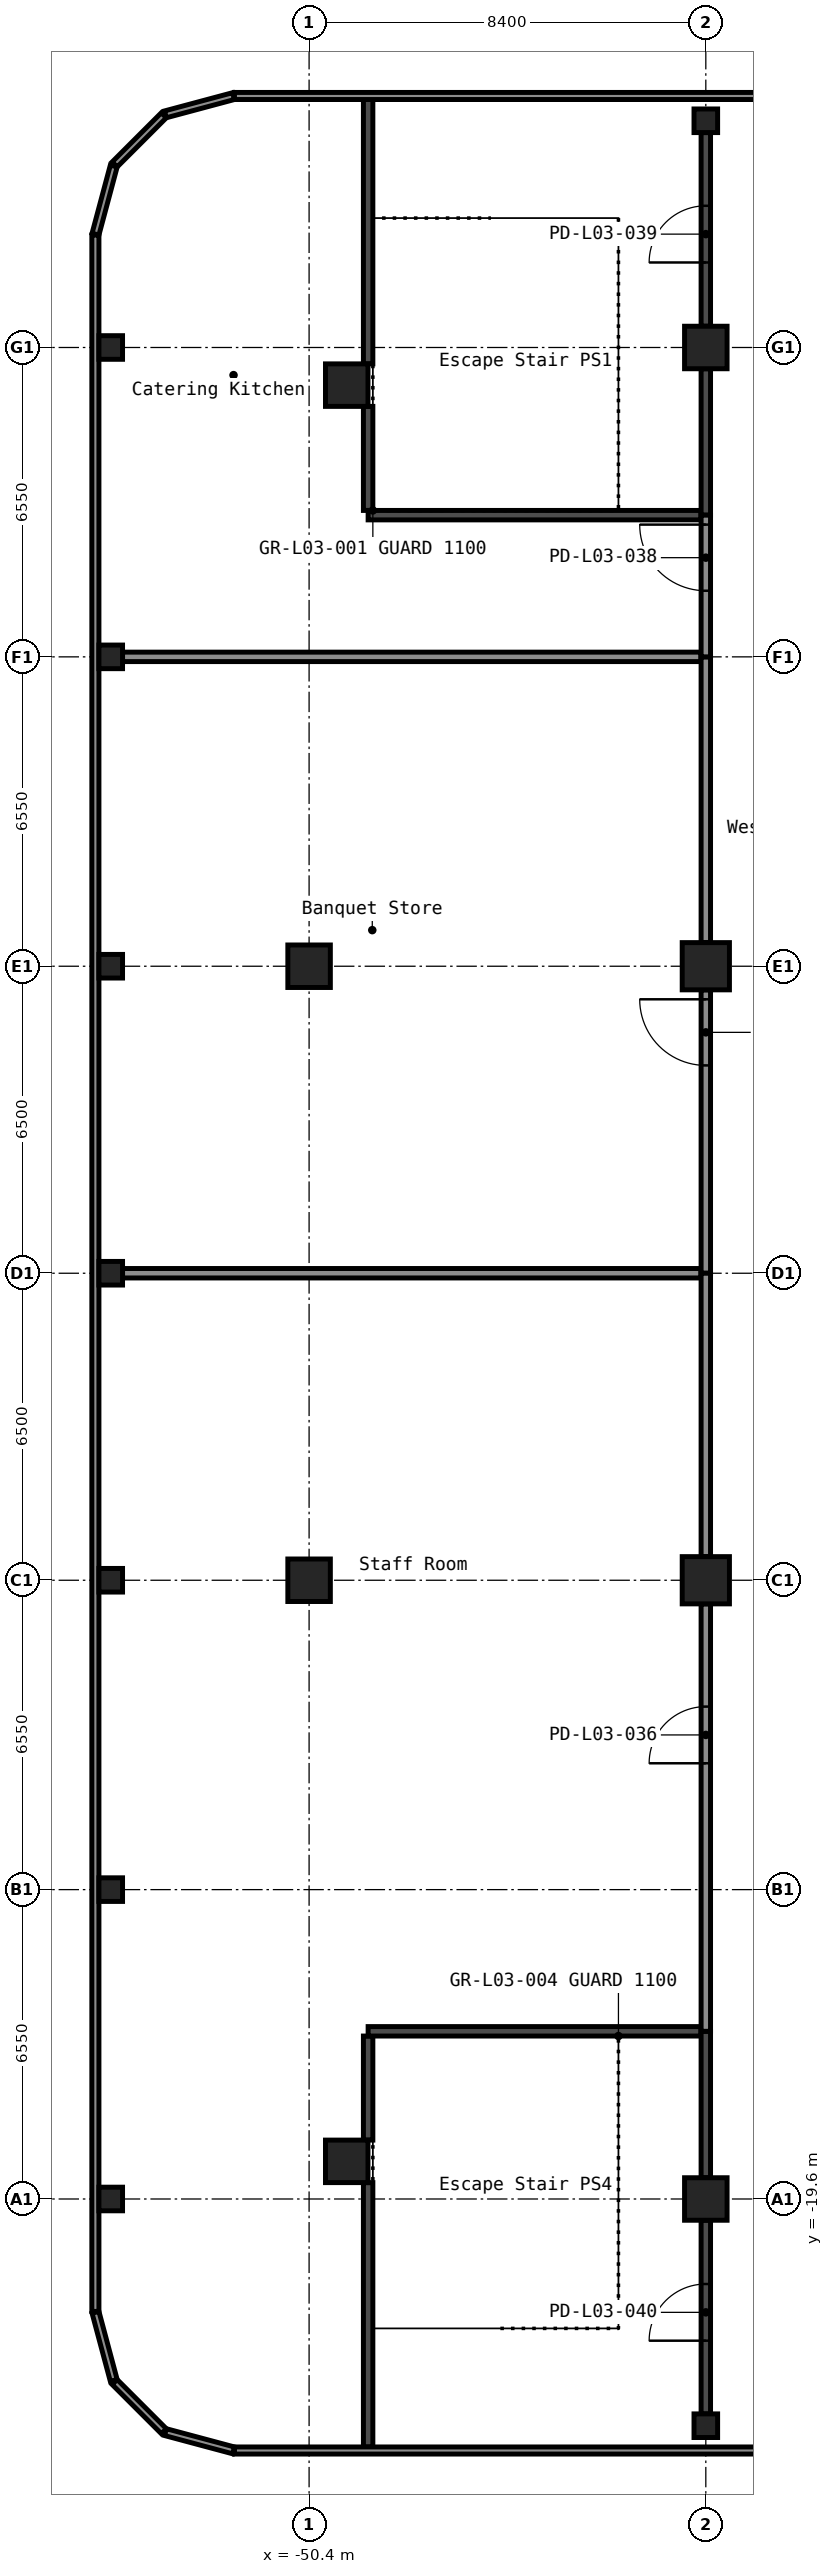
"""IFC4 building model, lengths in metres.
Left out: names, types, materials, properties, quantities, classifications, styles, units other than length and angle.
Written with IfcOpenShell. Run it as: python <this file> out.ifc"""

import sys

from ifc_helpers import new_model, si_unit, direction, frame, frame_2d, origin, origin_2d, place, context, subcontext, project, spatial, rectangle, hollow_rectangle, extrude, element, fill, save


model = new_model("IFC4")
c1 = context("Model", 3, precision=1e-05, world=origin(), true_north=direction((0.0, 1.0)))
c2 = subcontext(c1, "Body", "Model", "MODEL_VIEW")
j1 = project(units=[si_unit("LENGTHUNIT", "METRE"), si_unit("PLANEANGLEUNIT", "RADIAN")], contexts=[c1])
p1 = place(None, origin())
s1 = spatial("IfcSite", under=j1, at=p1, CompositionType="ELEMENT")
p2 = place(p1, origin())
s2 = spatial("IfcBuilding", under=s1, at=p2, CompositionType="ELEMENT")
p3 = place(p2, frame((0.0, 0.0, 15.0)))
s3 = spatial("IfcBuildingStorey", under=s2, at=p3, CompositionType="ELEMENT", Elevation=15.0)
for number, where, z_axis, x_axis in (
    (1, (-49.603, -18.803, 0.0), (0.0, 0.0, 1.0), (1.0, 0.0, 0.0)),
    (2, (-50.4, -6.5, 0.0), (0.0, 0.0, 1.0), (1.0, 0.0, 0.0)),
    (3, (-50.4, 6.5, 0.0), (0.0, 0.0, 1.0), (1.0, 0.0, 0.0)),
    (4, (-49.603, 18.803, 0.0), (0.0, 0.0, 1.0), (1.0, 0.0, 0.0)),
    (5, (-42.0, -19.6, 0.0), (0.0, 0.0, 1.0), (1.0, 0.0, 0.0)),
):
    element("IfcColumn", number, at=place(p3, frame(where, z_axis=z_axis, x_axis=x_axis)), inside=s3, PredefinedType="COLUMN", context=c2, shape_type="SweptSolid", body=[
        extrude(hollow_rectangle(XDim=0.9, YDim=0.9, WallThickness=0.036, at=origin_2d()), origin(), (0.0, 0.0, 1.0), 4.4),
    ])
for number, where, z_axis, x_axis in (
    (6, (-42.0, -6.5, 0.0), (0.0, 0.0, 1.0), (1.0, 0.0, 0.0)),
    (7, (-42.0, 6.5, 0.0), (0.0, 0.0, 1.0), (1.0, 0.0, 0.0)),
):
    element("IfcColumn", number, at=place(p3, frame(where, z_axis=z_axis, x_axis=x_axis)), inside=s3, PredefinedType="COLUMN", context=c2, shape_type="SweptSolid", body=[
        extrude(hollow_rectangle(XDim=1.0, YDim=1.0, WallThickness=0.04, at=origin_2d()), origin(), (0.0, 0.0, 1.0), 4.4),
    ])
p4 = place(p3, frame((-42.0, 19.6, 0.0), z_axis=(0.0, 0.0, 1.0), x_axis=(1.0, 0.0, 0.0)))
e8 = element("IfcColumn", 8, at=p4, inside=s3, PredefinedType="COLUMN", context=c2, shape_type="SweptSolid", body=[
    extrude(hollow_rectangle(XDim=0.9, YDim=0.9, WallThickness=0.036, at=origin_2d()), origin(), (0.0, 0.0, 1.0), 4.4),
])
for number, where, z_axis, x_axis in (
    (9, (-42.0, -24.4, 0.0), (0.0, 0.0, 1.0), (1.0, 0.0, 0.0)),
    (10, (-42.0, 24.4, 0.0), (0.0, 0.0, 1.0), (1.0, 0.0, 0.0)),
    (11, (-54.6, -19.6, 0.0), (0.0, 0.0, 1.0), (1.0, 0.0, 0.0)),
    (12, (-54.6, -13.05, 0.0), (0.0, 0.0, 1.0), (1.0, 0.0, 0.0)),
    (13, (-54.6, -6.5, 0.0), (0.0, 0.0, 1.0), (1.0, 0.0, 0.0)),
    (14, (-54.6, 0.0, 0.0), (0.0, 0.0, 1.0), (1.0, 0.0, 0.0)),
    (15, (-54.6, 6.5, 0.0), (0.0, 0.0, 1.0), (1.0, 0.0, 0.0)),
    (16, (-54.6, 13.05, 0.0), (0.0, 0.0, 1.0), (1.0, 0.0, 0.0)),
    (17, (-54.6, 19.6, 0.0), (0.0, 0.0, 1.0), (1.0, 0.0, 0.0)),
):
    element("IfcColumn", number, at=place(p3, frame(where, z_axis=z_axis, x_axis=x_axis)), inside=s3, PredefinedType="COLUMN", context=c2, shape_type="SweptSolid", body=[
        extrude(hollow_rectangle(XDim=0.5, YDim=0.5, WallThickness=0.019, InnerFilletRadius=0.029, OuterFilletRadius=0.048, at=origin_2d()), origin(), (0.0, 0.0, 1.0), 4.4),
    ])
p5 = place(p3, frame((-54.35, 13.05, 0.0), z_axis=(0.0, 0.0, 1.0), x_axis=(1.0, 0.0, 0.0)))
e18 = element("IfcWall", 18, at=p5, inside=s3, PredefinedType="PARTITIONING", context=c2, shape_type="SweptSolid", body=[
    extrude(rectangle(XDim=12.25, YDim=0.2, at=frame_2d((6.125, 0.0))), origin(), (0.0, 0.0, 1.0), 4.4),
])
p6 = place(p3, frame((-49.15, 16.15, 0.0), z_axis=(0.0, 0.0, 1.0), x_axis=(0.0, 1.0, 0.0)))
e19 = element("IfcWall", 19, at=p6, inside=s3, PredefinedType="SHEAR", context=c2, shape_type="SweptSolid", body=[
    extrude(rectangle(XDim=2.203, YDim=0.2, at=frame_2d((1.102, 0.0))), origin(), (0.0, 0.0, 1.0), 4.4),
])
p7 = place(p3, frame((-49.15, 19.253, 0.0), z_axis=(0.0, 0.0, 1.0), x_axis=(0.0, 1.0, 0.0)))
e20 = element("IfcWall", 20, at=p7, inside=s3, PredefinedType="SHEAR", context=c2, shape_type="SweptSolid", body=[
    extrude(rectangle(XDim=5.597, YDim=0.2, at=frame_2d((2.798, 0.0))), origin(), (0.0, 0.0, 1.0), 4.4),
])
p8 = place(p3, frame((-42.1, 16.05, 0.0), z_axis=(0.0, 0.0, 1.0), x_axis=(-1.0, 0.0, 0.0)))
e21 = element("IfcWall", 21, at=p8, inside=s3, PredefinedType="SHEAR", context=c2, shape_type="SweptSolid", body=[
    extrude(rectangle(XDim=7.05, YDim=0.2, at=frame_2d((3.525, 0.0))), origin(), (0.0, 0.0, 1.0), 4.4),
])
p9 = place(p3, frame((-42.0, 24.15, 0.0), z_axis=(0.0, 0.0, 1.0), x_axis=(0.0, -1.0, 0.0)))
e22 = element("IfcWall", 22, at=p9, inside=s3, PredefinedType="SHEAR", context=c2, shape_type="SweptSolid", body=[
    extrude(rectangle(XDim=4.1, YDim=0.2, at=frame_2d((2.05, 0.0))), origin(), (0.0, 0.0, 1.0), 4.4),
])
p10 = place(p9, frame((1.55, 0.0, 0.0)))
e23 = element("IfcOpeningElement", 23, at=p10, cuts=e22, PredefinedType="OPENING", context=c2, shape_type="SweptSolid", body=[
    extrude(rectangle(XDim=1.2, YDim=2.1, at=frame_2d((0.6, 1.05))), frame((0.0, 0.11, 0.0), z_axis=(0.0, -1.0, 0.0), x_axis=(1.0, 0.0, 0.0)), (0.0, 0.0, 1.0), 0.22),
])
p11 = place(p3, frame((-42.0, 19.15, 0.0), z_axis=(0.0, 0.0, 1.0), x_axis=(0.0, -1.0, 0.0)))
e24 = element("IfcWall", 24, at=p11, inside=s3, PredefinedType="SHEAR", context=c2, shape_type="SweptSolid", body=[
    extrude(rectangle(XDim=3.1, YDim=0.2, at=frame_2d((1.55, 0.0))), origin(), (0.0, 0.0, 1.0), 4.4),
])
p12 = place(p3, frame((-49.15, -24.85, 0.0), z_axis=(0.0, 0.0, 1.0), x_axis=(0.0, 1.0, 0.0)))
e25 = element("IfcWall", 25, at=p12, inside=s3, PredefinedType="SHEAR", context=c2, shape_type="SweptSolid", body=[
    extrude(rectangle(XDim=5.597, YDim=0.2, at=frame_2d((2.798, 0.0))), origin(), (0.0, 0.0, 1.0), 4.4),
])
p13 = place(p3, frame((-49.15, -18.353, 0.0), z_axis=(0.0, 0.0, 1.0), x_axis=(0.0, 1.0, 0.0)))
e26 = element("IfcWall", 26, at=p13, inside=s3, PredefinedType="SHEAR", context=c2, shape_type="SweptSolid", body=[
    extrude(rectangle(XDim=2.203, YDim=0.2, at=frame_2d((1.102, 0.0))), origin(), (0.0, 0.0, 1.0), 4.4),
])
p14 = place(p3, frame((-49.15, -16.05, 0.0), z_axis=(0.0, 0.0, 1.0), x_axis=(1.0, 0.0, 0.0)))
e27 = element("IfcWall", 27, at=p14, inside=s3, PredefinedType="SHEAR", context=c2, shape_type="SweptSolid", body=[
    extrude(rectangle(XDim=7.05, YDim=0.2, at=frame_2d((3.525, 0.0))), origin(), (0.0, 0.0, 1.0), 4.4),
])
p15 = place(p3, frame((-42.0, -16.05, 0.0), z_axis=(0.0, 0.0, 1.0), x_axis=(0.0, -1.0, 0.0)))
e28 = element("IfcWall", 28, at=p15, inside=s3, PredefinedType="SHEAR", context=c2, shape_type="SweptSolid", body=[
    extrude(rectangle(XDim=3.1, YDim=0.2, at=frame_2d((1.55, 0.0))), origin(), (0.0, 0.0, 1.0), 4.4),
])
p16 = place(p3, frame((-42.0, -20.05, 0.0), z_axis=(0.0, 0.0, 1.0), x_axis=(0.0, -1.0, 0.0)))
e29 = element("IfcWall", 29, at=p16, inside=s3, PredefinedType="SHEAR", context=c2, shape_type="SweptSolid", body=[
    extrude(rectangle(XDim=4.1, YDim=0.2, at=frame_2d((2.05, 0.0))), origin(), (0.0, 0.0, 1.0), 4.4),
])
p17 = place(p16, frame((1.35, 0.0, 0.0)))
e30 = element("IfcOpeningElement", 30, at=p17, cuts=e29, PredefinedType="OPENING", context=c2, shape_type="SweptSolid", body=[
    extrude(rectangle(XDim=1.2, YDim=2.1, at=frame_2d((0.6, 1.05))), frame((0.0, 0.11, 0.0), z_axis=(0.0, -1.0, 0.0), x_axis=(1.0, 0.0, 0.0)), (0.0, 0.0, 1.0), 0.22),
])
p18 = place(p3, frame((-54.35, 0.0, 0.0), z_axis=(0.0, 0.0, 1.0), x_axis=(1.0, 0.0, 0.0)))
e31 = element("IfcWall", 31, at=p18, inside=s3, PredefinedType="PARTITIONING", context=c2, shape_type="SweptSolid", body=[
    extrude(rectangle(XDim=12.25, YDim=0.2, at=frame_2d((6.125, 0.0))), origin(), (0.0, 0.0, 1.0), 4.4),
])
p19 = place(p3, frame((-42.0, 0.0, 0.0), z_axis=(0.0, 0.0, 1.0), x_axis=(0.0, 1.0, 0.0)))
e32 = element("IfcWall", 32, at=p19, inside=s3, PredefinedType="PARTITIONING", context=c2, shape_type="SweptSolid", body=[
    extrude(rectangle(XDim=6.0, YDim=0.2, at=frame_2d((3.0, 0.0))), origin(), (0.0, 0.0, 1.0), 4.4),
])
p20 = place(p19, frame((4.4, 0.0, 0.0)))
e33 = element("IfcOpeningElement", 33, at=p20, cuts=e32, PredefinedType="OPENING", context=c2, shape_type="SweptSolid", body=[
    extrude(rectangle(XDim=1.4, YDim=2.1, at=frame_2d((0.7, 1.05))), frame((0.0, 0.11, 0.0), z_axis=(0.0, -1.0, 0.0), x_axis=(1.0, 0.0, 0.0)), (0.0, 0.0, 1.0), 0.22),
])
p21 = place(p3, frame((-42.0, 7.0, 0.0), z_axis=(0.0, 0.0, 1.0), x_axis=(0.0, 1.0, 0.0)))
e34 = element("IfcWall", 34, at=p21, inside=s3, PredefinedType="PARTITIONING", context=c2, shape_type="SweptSolid", body=[
    extrude(rectangle(XDim=6.05, YDim=0.2, at=frame_2d((3.025, 0.0))), origin(), (0.0, 0.0, 1.0), 4.4),
])
p22 = place(p3, frame((-42.0, 13.05, 0.0), z_axis=(0.0, 0.0, 1.0), x_axis=(0.0, 1.0, 0.0)))
e35 = element("IfcWall", 35, at=p22, inside=s3, PredefinedType="PARTITIONING", context=c2, shape_type="SweptSolid", body=[
    extrude(rectangle(XDim=3.0, YDim=0.2, at=frame_2d((1.5, 0.0))), origin(), (0.0, 0.0, 1.0), 4.4),
])
p23 = place(p22, frame((1.4, 0.0, 0.0)))
e36 = element("IfcOpeningElement", 36, at=p23, cuts=e35, PredefinedType="OPENING", context=c2, shape_type="SweptSolid", body=[
    extrude(rectangle(XDim=1.4, YDim=2.1, at=frame_2d((0.7, 1.05))), frame((0.0, 0.11, 0.0), z_axis=(0.0, -1.0, 0.0), x_axis=(1.0, 0.0, 0.0)), (0.0, 0.0, 1.0), 0.22),
])
p24 = place(p3, frame((-42.0, -16.05, 0.0), z_axis=(0.0, 0.0, 1.0), x_axis=(0.0, 1.0, 0.0)))
e37 = element("IfcWall", 37, at=p24, inside=s3, PredefinedType="PARTITIONING", context=c2, shape_type="SweptSolid", body=[
    extrude(rectangle(XDim=9.05, YDim=0.2, at=frame_2d((4.525, 0.0))), origin(), (0.0, 0.0, 1.0), 4.4),
])
p25 = place(p24, frame((5.675, 0.0, 0.0)))
e38 = element("IfcOpeningElement", 38, at=p25, cuts=e37, PredefinedType="OPENING", context=c2, shape_type="SweptSolid", body=[
    extrude(rectangle(XDim=1.2, YDim=2.1, at=frame_2d((0.6, 1.05))), frame((0.0, 0.11, 0.0), z_axis=(0.0, -1.0, 0.0), x_axis=(1.0, 0.0, 0.0)), (0.0, 0.0, 1.0), 0.22),
])
p26 = place(p3, frame((-42.0, -6.0, 0.0), z_axis=(0.0, 0.0, 1.0), x_axis=(0.0, 1.0, 0.0)))
e39 = element("IfcWall", 39, at=p26, inside=s3, PredefinedType="PARTITIONING", context=c2, shape_type="SweptSolid", body=[
    extrude(rectangle(XDim=6.0, YDim=0.2, at=frame_2d((3.0, 0.0))), origin(), (0.0, 0.0, 1.0), 4.4),
])
p27 = place(p3, frame((-8.4, -24.925, 0.0), z_axis=(0.0, 0.0, 1.0), x_axis=(-1.0, 0.0, 0.0)))
e40 = element("IfcWall", 40, at=p27, inside=s3, PredefinedType="STANDARD", context=c2, shape_type="SweptSolid", body=[
    extrude(rectangle(XDim=43.58, YDim=0.15, at=frame_2d((21.79, 0.0))), origin(), (0.0, 0.0, 1.0), 4.4),
])
p28 = place(p3, frame((-52.0, -24.922, 0.0), z_axis=(0.0, 0.0, 1.0), x_axis=(-0.965946591624, 0.258741535379, 0.0)))
e41 = element("IfcWall", 41, at=p28, inside=s3, PredefinedType="STANDARD", context=c2, shape_type="SweptSolid", body=[
    extrude(rectangle(XDim=1.493, YDim=0.15, at=frame_2d((0.746, 0.0))), origin(), (0.0, 0.0, 1.0), 4.4),
])
p29 = place(p3, frame((-53.475, -24.517, 0.0), z_axis=(0.0, 0.0, 1.0), x_axis=(-0.707106781187, 0.707106781187, 0.0)))
e42 = element("IfcWall", 42, at=p29, inside=s3, PredefinedType="STANDARD", context=c2, shape_type="SweptSolid", body=[
    extrude(rectangle(XDim=1.473, YDim=0.15, at=frame_2d((0.736, 0.0))), origin(), (0.0, 0.0, 1.0), 4.4),
])
p30 = place(p3, frame((-54.536, -23.442, 0.0), z_axis=(0.0, 0.0, 1.0), x_axis=(-0.258741535379, 0.965946591624, 0.0)))
e43 = element("IfcWall", 43, at=p30, inside=s3, PredefinedType="STANDARD", context=c2, shape_type="SweptSolid", body=[
    extrude(rectangle(XDim=1.493, YDim=0.15, at=frame_2d((0.746, 0.0))), origin(), (0.0, 0.0, 1.0), 4.4),
])
p31 = place(p3, frame((-54.925, -21.98, 0.0), z_axis=(0.0, 0.0, 1.0), x_axis=(0.0, 1.0, 0.0)))
e44 = element("IfcWall", 44, at=p31, inside=s3, PredefinedType="STANDARD", context=c2, shape_type="SweptSolid", body=[
    extrude(rectangle(XDim=43.96, YDim=0.15, at=frame_2d((21.98, 0.0))), origin(), (0.0, 0.0, 1.0), 4.4),
])
p32 = place(p3, frame((-54.922, 22.0, 0.0), z_axis=(0.0, 0.0, 1.0), x_axis=(0.258741535379, 0.965946591624, 0.0)))
e45 = element("IfcWall", 45, at=p32, inside=s3, PredefinedType="STANDARD", context=c2, shape_type="SweptSolid", body=[
    extrude(rectangle(XDim=1.493, YDim=0.15, at=frame_2d((0.746, 0.0))), origin(), (0.0, 0.0, 1.0), 4.4),
])
p33 = place(p3, frame((-54.517, 23.475, 0.0), z_axis=(0.0, 0.0, 1.0), x_axis=(0.707106781187, 0.707106781187, 0.0)))
e46 = element("IfcWall", 46, at=p33, inside=s3, PredefinedType="STANDARD", context=c2, shape_type="SweptSolid", body=[
    extrude(rectangle(XDim=1.473, YDim=0.15, at=frame_2d((0.736, 0.0))), origin(), (0.0, 0.0, 1.0), 4.4),
])
p34 = place(p3, frame((-53.442, 24.536, 0.0), z_axis=(0.0, 0.0, 1.0), x_axis=(0.965946591624, 0.258741535379, 0.0)))
e47 = element("IfcWall", 47, at=p34, inside=s3, PredefinedType="STANDARD", context=c2, shape_type="SweptSolid", body=[
    extrude(rectangle(XDim=1.493, YDim=0.15, at=frame_2d((0.746, 0.0))), origin(), (0.0, 0.0, 1.0), 4.4),
])
p35 = place(p3, frame((-51.98, 24.925, 0.0), z_axis=(0.0, 0.0, 1.0), x_axis=(1.0, 0.0, 0.0)))
e48 = element("IfcWall", 48, at=p35, inside=s3, PredefinedType="STANDARD", context=c2, shape_type="SweptSolid", body=[
    extrude(rectangle(XDim=12.98, YDim=0.15, at=frame_2d((6.49, 0.0))), origin(), (0.0, 0.0, 1.0), 4.4),
])
p36 = place(p25, origin())
e49 = element("IfcDoor", 49, at=p36, inside=s3, OperationType="SINGLE_SWING_RIGHT", PredefinedType="DOOR", context=c2, shape_type="SweptSolid", body=[
    extrude(rectangle(XDim=1.2, YDim=2.1, at=frame_2d((0.6, 1.05))), frame((0.0, 0.025, 0.0), z_axis=(0.0, -1.0, 0.0), x_axis=(1.0, 0.0, 0.0)), (0.0, 0.0, 1.0), 0.05),
])
fill(e38, e49)
p37 = place(p20, origin())
e50 = element("IfcDoor", 50, at=p37, inside=s3, OperationType="SINGLE_SWING_LEFT", PredefinedType="DOOR", context=c2, shape_type="SweptSolid", body=[
    extrude(rectangle(XDim=1.4, YDim=2.1, at=frame_2d((0.7, 1.05))), frame((0.0, 0.025, 0.0), z_axis=(0.0, -1.0, 0.0), x_axis=(1.0, 0.0, 0.0)), (0.0, 0.0, 1.0), 0.05),
])
fill(e33, e50)
p38 = place(p23, origin())
e51 = element("IfcDoor", 51, at=p38, inside=s3, OperationType="SINGLE_SWING_LEFT", PredefinedType="DOOR", context=c2, shape_type="SweptSolid", body=[
    extrude(rectangle(XDim=1.4, YDim=2.1, at=frame_2d((0.7, 1.05))), frame((0.0, 0.025, 0.0), z_axis=(0.0, -1.0, 0.0), x_axis=(1.0, 0.0, 0.0)), (0.0, 0.0, 1.0), 0.05),
])
fill(e36, e51)
p39 = place(p10, origin())
e52 = element("IfcDoor", 52, at=p39, inside=s3, OperationType="SINGLE_SWING_RIGHT", PredefinedType="DOOR", context=c2, shape_type="SweptSolid", body=[
    extrude(rectangle(XDim=1.2, YDim=2.1, at=frame_2d((0.6, 1.05))), frame((0.0, 0.025, 0.0), z_axis=(0.0, -1.0, 0.0), x_axis=(1.0, 0.0, 0.0)), (0.0, 0.0, 1.0), 0.05),
])
fill(e23, e52)
p40 = place(p17, origin())
e53 = element("IfcDoor", 53, at=p40, inside=s3, OperationType="SINGLE_SWING_RIGHT", PredefinedType="DOOR", context=c2, shape_type="SweptSolid", body=[
    extrude(rectangle(XDim=1.2, YDim=2.1, at=frame_2d((0.6, 1.05))), frame((0.0, 0.025, 0.0), z_axis=(0.0, -1.0, 0.0), x_axis=(1.0, 0.0, 0.0)), (0.0, 0.0, 1.0), 0.05),
])
fill(e30, e53)
save(model, sys.argv[1])
